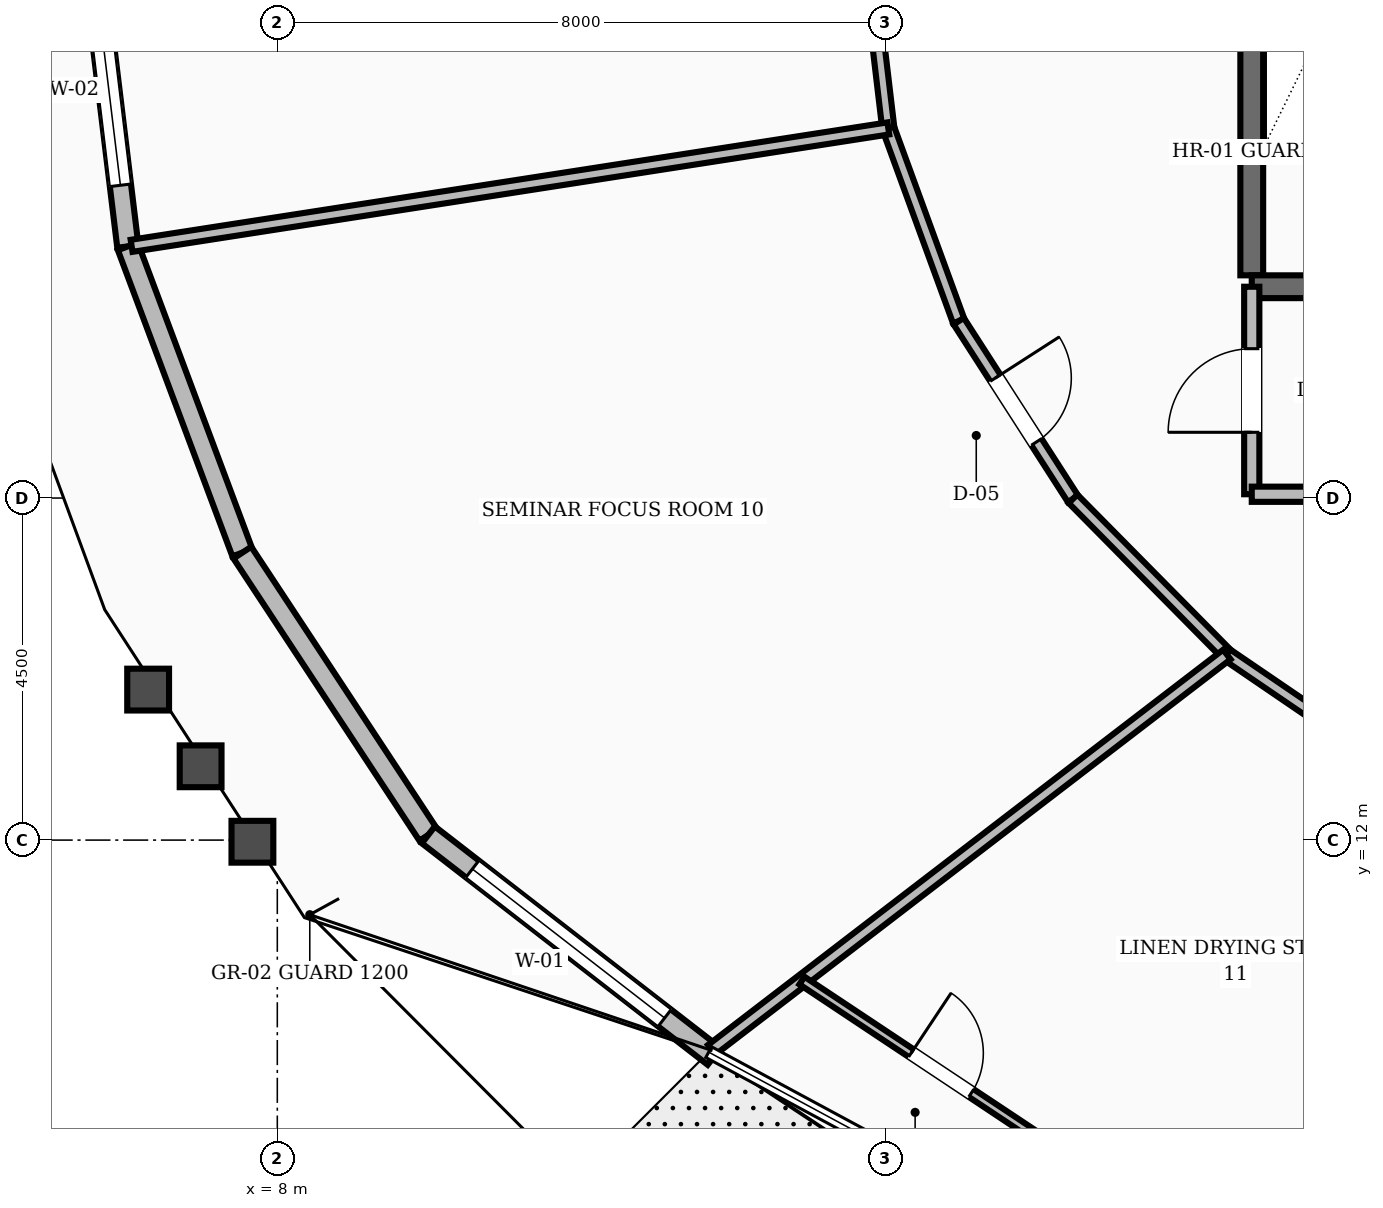
"""IFC4 building model, lengths in metres.
Left out: names, types, materials, properties, quantities, classifications, styles, units other than length and angle.
Written with IfcOpenShell. Run it as: python <this file> out.ifc"""

import sys

from ifc_helpers import new_model, si_unit, direction, frame, frame_2d, origin, place, context, subcontext, project, spatial, rectangle, extrude, element, fill, save


model = new_model("IFC4")
c1 = context("Model", 3, precision=1e-05, world=origin(), true_north=direction((0.0, 1.0)))
c2 = subcontext(c1, "Body", "Model", "MODEL_VIEW")
j1 = project(units=[si_unit("LENGTHUNIT", "METRE"), si_unit("PLANEANGLEUNIT", "RADIAN")], contexts=[c1])
p1 = place(None, origin())
s1 = spatial("IfcSite", under=j1, at=p1, CompositionType="ELEMENT")
p2 = place(p1, origin())
s2 = spatial("IfcBuilding", under=s1, at=p2, CompositionType="ELEMENT")
p3 = place(p2, frame((0.0, 0.0, 52.0)))
s3 = spatial("IfcBuildingStorey", under=s2, at=p3, CompositionType="ELEMENT", Elevation=52.0)
p4 = place(p3, frame((20.82, 19.43, 0.0), z_axis=(0.0, 0.0, 1.0), x_axis=(0.0, 1.0, 0.0)))
e1 = element("IfcWall", 1, at=p4, inside=s3, PredefinedType="SHEAR", context=c2, shape_type="SweptSolid", body=[
    extrude(rectangle(XDim=8.74, YDim=0.3, at=frame_2d((4.37, 0.0))), origin(), (0.0, 0.0, 1.0), 3.6),
])
p5 = place(p3, frame((20.82, 19.28, 0.0), z_axis=(0.0, 0.0, 1.0), x_axis=(1.0, 0.0, 0.0)))
e2 = element("IfcWall", 2, at=p5, inside=s3, PredefinedType="SHEAR", context=c2, shape_type="SweptSolid", body=[
    extrude(rectangle(XDim=3.6, YDim=0.3, at=frame_2d((1.8, 0.0))), origin(), (0.0, 0.0, 1.0), 3.6),
])
p6 = place(p5, frame((1.3, 0.0, 0.0)))
e3 = element("IfcOpeningElement", 3, at=p6, cuts=e2, PredefinedType="OPENING", context=c2, shape_type="SweptSolid", body=[
    extrude(rectangle(XDim=1.1, YDim=2.1, at=frame_2d((0.55, 1.05))), frame((0.0, 0.16, 0.0), z_axis=(0.0, -1.0, 0.0), x_axis=(1.0, 0.0, 0.0)), (0.0, 0.0, 1.0), 0.32),
])
p7 = place(p3, frame((5.525, 24.0, 0.0), z_axis=(0.0, 0.0, 1.0), x_axis=(0.120495484084, -0.992713875352, 0.0)))
e4 = element("IfcWall", 4, at=p7, inside=s3, PredefinedType="STANDARD", context=c2, shape_type="SweptSolid", body=[
    extrude(rectangle(XDim=4.22, YDim=0.28, at=frame_2d((2.11, 0.0))), origin(), (0.0, 0.0, 1.0), 2.65),
])
p8 = place(p7, frame((0.81, 0.0, 0.8)))
e5 = element("IfcOpeningElement", 5, at=p8, cuts=e4, PredefinedType="OPENING", context=c2, shape_type="SweptSolid", body=[
    extrude(rectangle(XDim=2.6, YDim=1.65, at=frame_2d((1.3, 0.825))), frame((0.0, 0.15, 0.0), z_axis=(0.0, -1.0, 0.0), x_axis=(1.0, 0.0, 0.0)), (0.0, 0.0, 1.0), 0.3),
])
p9 = place(p3, frame((6.033, 19.81, 0.0), z_axis=(0.0, 0.0, 1.0), x_axis=(0.350283521278, -0.936643718135, 0.0)))
e6 = element("IfcWall", 6, at=p9, inside=s3, PredefinedType="STANDARD", context=c2, shape_type="SweptSolid", body=[
    extrude(rectangle(XDim=4.301, YDim=0.28, at=frame_2d((2.15, 0.0))), origin(), (0.0, 0.0, 1.0), 2.65),
])
p10 = place(p3, frame((7.54, 15.782, 0.0), z_axis=(0.0, 0.0, 1.0), x_axis=(0.550282912527, -0.834978272879, 0.0)))
e7 = element("IfcWall", 7, at=p10, inside=s3, PredefinedType="STANDARD", context=c2, shape_type="SweptSolid", body=[
    extrude(rectangle(XDim=4.446, YDim=0.28, at=frame_2d((2.223, 0.0))), origin(), (0.0, 0.0, 1.0), 2.65),
])
p11 = place(p3, frame((9.987, 12.069, 0.0), z_axis=(0.0, 0.0, 1.0), x_axis=(0.790411946791, -0.612575672362, 0.0)))
e8 = element("IfcWall", 8, at=p11, inside=s3, PredefinedType="STANDARD", context=c2, shape_type="SweptSolid", body=[
    extrude(rectangle(XDim=4.758, YDim=0.28, at=frame_2d((2.379, 0.0))), origin(), (0.0, 0.0, 1.0), 2.65),
])
p12 = place(p11, frame((0.733, 0.0, 0.8)))
e9 = element("IfcOpeningElement", 9, at=p12, cuts=e8, PredefinedType="OPENING", context=c2, shape_type="SweptSolid", body=[
    extrude(rectangle(XDim=3.2, YDim=1.65, at=frame_2d((1.6, 0.825))), frame((0.0, 0.15, 0.0), z_axis=(0.0, -1.0, 0.0), x_axis=(1.0, 0.0, 0.0)), (0.0, 0.0, 1.0), 0.3),
])
p13 = place(p3, frame((20.82, 16.55, 0.0), z_axis=(0.0, 0.0, 1.0), x_axis=(0.0, 1.0, 0.0)))
e10 = element("IfcWall", 10, at=p13, inside=s3, PredefinedType="SOLIDWALL", context=c2, shape_type="SweptSolid", body=[
    extrude(rectangle(XDim=2.73, YDim=0.2, at=frame_2d((1.365, 0.0))), origin(), (0.0, 0.0, 1.0), 2.61),
])
p14 = place(p13, frame((0.815, 0.0, 0.0)))
e11 = element("IfcOpeningElement", 11, at=p14, cuts=e10, PredefinedType="OPENING", context=c2, shape_type="SweptSolid", body=[
    extrude(rectangle(XDim=1.1, YDim=2.1, at=frame_2d((0.55, 1.05))), frame((0.0, 0.11, 0.0), z_axis=(0.0, -1.0, 0.0), x_axis=(1.0, 0.0, 0.0)), (0.0, 0.0, 1.0), 0.22),
])
p15 = place(p3, frame((20.82, 16.55, 0.0), z_axis=(0.0, 0.0, 1.0), x_axis=(1.0, 0.0, 0.0)))
e12 = element("IfcWall", 12, at=p15, inside=s3, PredefinedType="SOLIDWALL", context=c2, shape_type="SweptSolid", body=[
    extrude(rectangle(XDim=3.98, YDim=0.2, at=frame_2d((1.99, 0.0))), origin(), (0.0, 0.0, 1.0), 2.61),
])
p16 = place(p3, frame((15.726, 24.0, 0.0), z_axis=(0.0, 0.0, 1.0), x_axis=(0.117763961213, -0.99304161516, 0.0)))
e13 = element("IfcWall", 13, at=p16, inside=s3, PredefinedType="SOLIDWALL", context=c2, shape_type="SweptSolid", body=[
    extrude(rectangle(XDim=2.656, YDim=0.16, at=frame_2d((1.328, 0.0))), origin(), (0.0, 0.0, 1.0), 2.61),
])
p17 = place(p3, frame((16.039, 21.363, 0.0), z_axis=(0.0, 0.0, 1.0), x_axis=(0.343013437329, -0.939330496583, 0.0)))
e14 = element("IfcWall", 14, at=p17, inside=s3, PredefinedType="SOLIDWALL", context=c2, shape_type="SweptSolid", body=[
    extrude(rectangle(XDim=2.7, YDim=0.16, at=frame_2d((1.35, 0.0))), origin(), (0.0, 0.0, 1.0), 2.61),
])
p18 = place(p3, frame((16.965, 18.827, 0.0), z_axis=(0.0, 0.0, 1.0), x_axis=(0.541126045017, -0.840941498206, 0.0)))
e15 = element("IfcWall", 15, at=p18, inside=s3, PredefinedType="SOLIDWALL", context=c2, shape_type="SweptSolid", body=[
    extrude(rectangle(XDim=2.779, YDim=0.16, at=frame_2d((1.39, 0.0))), origin(), (0.0, 0.0, 1.0), 2.61),
])
p19 = place(p18, frame((0.89, 0.0, 0.0)))
e16 = element("IfcOpeningElement", 16, at=p19, cuts=e15, PredefinedType="OPENING", context=c2, shape_type="SweptSolid", body=[
    extrude(rectangle(XDim=1.0, YDim=2.1, at=frame_2d((0.5, 1.05))), frame((0.0, 0.09, 0.0), z_axis=(0.0, -1.0, 0.0), x_axis=(1.0, 0.0, 0.0)), (0.0, 0.0, 1.0), 0.18),
])
p20 = place(p3, frame((18.469, 16.49, 0.0), z_axis=(0.0, 0.0, 1.0), x_axis=(0.702811997, -0.711375636969, 0.0)))
e17 = element("IfcWall", 17, at=p20, inside=s3, PredefinedType="SOLIDWALL", context=c2, shape_type="SweptSolid", body=[
    extrude(rectangle(XDim=2.879, YDim=0.16, at=frame_2d((1.44, 0.0))), origin(), (0.0, 0.0, 1.0), 2.61),
])
p21 = place(p3, frame((20.492, 14.441, 0.0), z_axis=(0.0, 0.0, 1.0), x_axis=(0.826293096206, -0.56324037423, 0.0)))
e18 = element("IfcWall", 18, at=p21, inside=s3, PredefinedType="SOLIDWALL", context=c2, shape_type="SweptSolid", body=[
    extrude(rectangle(XDim=2.985, YDim=0.16, at=frame_2d((1.492, 0.0))), origin(), (0.0, 0.0, 1.0), 2.61),
])
p22 = place(p3, frame((16.039, 21.363, 0.0), z_axis=(0.0, 0.0, 1.0), x_axis=(-0.988176752001, -0.153318970792, 0.0)))
e19 = element("IfcWall", 19, at=p22, inside=s3, PredefinedType="SOLIDWALL", context=c2, shape_type="SweptSolid", body=[
    extrude(rectangle(XDim=10.075, YDim=0.16, at=frame_2d((5.038, 0.0))), origin(), (0.0, 0.0, 1.0), 2.61),
])
p23 = place(p3, frame((20.492, 14.441, 0.0), z_axis=(0.0, 0.0, 1.0), x_axis=(-0.793377694402, -0.608729688799, 0.0)))
e20 = element("IfcWall", 20, at=p23, inside=s3, PredefinedType="SOLIDWALL", context=c2, shape_type="SweptSolid", body=[
    extrude(rectangle(XDim=8.543, YDim=0.16, at=frame_2d((4.271, 0.0))), origin(), (0.0, 0.0, 1.0), 2.61),
])
p24 = place(p3, frame((14.902, 10.152, 0.0), z_axis=(0.0, 0.0, 1.0), x_axis=(0.832826368546, -0.553534316781, 0.0)))
e21 = element("IfcWall", 21, at=p24, inside=s3, PredefinedType="PARTITIONING", context=c2, shape_type="SweptSolid", body=[
    extrude(rectangle(XDim=4.4, YDim=0.12, at=frame_2d((2.2, 0.0))), origin(), (0.0, 0.0, 1.0), 2.61),
])
p25 = place(p24, frame((1.725, 0.0, 0.0)))
e22 = element("IfcOpeningElement", 22, at=p25, cuts=e21, PredefinedType="OPENING", context=c2, shape_type="SweptSolid", body=[
    extrude(rectangle(XDim=0.95, YDim=2.1, at=frame_2d((0.475, 1.05))), frame((0.0, 0.07, 0.0), z_axis=(0.0, -1.0, 0.0), x_axis=(1.0, 0.0, 0.0)), (0.0, 0.0, 1.0), 0.14),
])
p26 = place(p8, origin())
e23 = element("IfcWindow", 23, at=p26, inside=s3, PartitioningType="SINGLE_PANEL", PredefinedType="WINDOW", context=c2, shape_type="SweptSolid", body=[
    extrude(rectangle(XDim=2.6, YDim=1.65, at=frame_2d((1.3, 0.825))), frame((0.0, 0.03, 0.0), z_axis=(0.0, -1.0, 0.0), x_axis=(1.0, 0.0, 0.0)), (0.0, 0.0, 1.0), 0.06),
])
fill(e5, e23)
p27 = place(p12, origin())
e24 = element("IfcWindow", 24, at=p27, inside=s3, PartitioningType="SINGLE_PANEL", PredefinedType="WINDOW", context=c2, shape_type="SweptSolid", body=[
    extrude(rectangle(XDim=3.2, YDim=1.65, at=frame_2d((1.6, 0.825))), frame((0.0, 0.03, 0.0), z_axis=(0.0, -1.0, 0.0), x_axis=(1.0, 0.0, 0.0)), (0.0, 0.0, 1.0), 0.06),
])
fill(e9, e24)
p28 = place(p14, origin())
e25 = element("IfcDoor", 25, at=p28, inside=s3, OperationType="SINGLE_SWING_LEFT", PredefinedType="DOOR", context=c2, shape_type="SweptSolid", body=[
    extrude(rectangle(XDim=1.1, YDim=2.1, at=frame_2d((0.55, 1.05))), frame((0.0, 0.025, 0.0), z_axis=(0.0, -1.0, 0.0), x_axis=(1.0, 0.0, 0.0)), (0.0, 0.0, 1.0), 0.05),
])
fill(e11, e25)
p29 = place(p19, origin())
e26 = element("IfcDoor", 26, at=p29, inside=s3, OperationType="SINGLE_SWING_LEFT", PredefinedType="DOOR", context=c2, shape_type="SweptSolid", body=[
    extrude(rectangle(XDim=1.0, YDim=2.1, at=frame_2d((0.5, 1.05))), frame((0.0, 0.025, 0.0), z_axis=(0.0, -1.0, 0.0), x_axis=(1.0, 0.0, 0.0)), (0.0, 0.0, 1.0), 0.05),
])
fill(e16, e26)
p30 = place(p25, origin())
e27 = element("IfcDoor", 27, at=p30, inside=s3, OperationType="SINGLE_SWING_LEFT", PredefinedType="DOOR", context=c2, shape_type="SweptSolid", body=[
    extrude(rectangle(XDim=0.95, YDim=2.1, at=frame_2d((0.475, 1.05))), frame((0.0, 0.025, 0.0), z_axis=(0.0, -1.0, 0.0), x_axis=(1.0, 0.0, 0.0)), (0.0, 0.0, 1.0), 0.05),
])
fill(e22, e27)
save(model, sys.argv[1])
